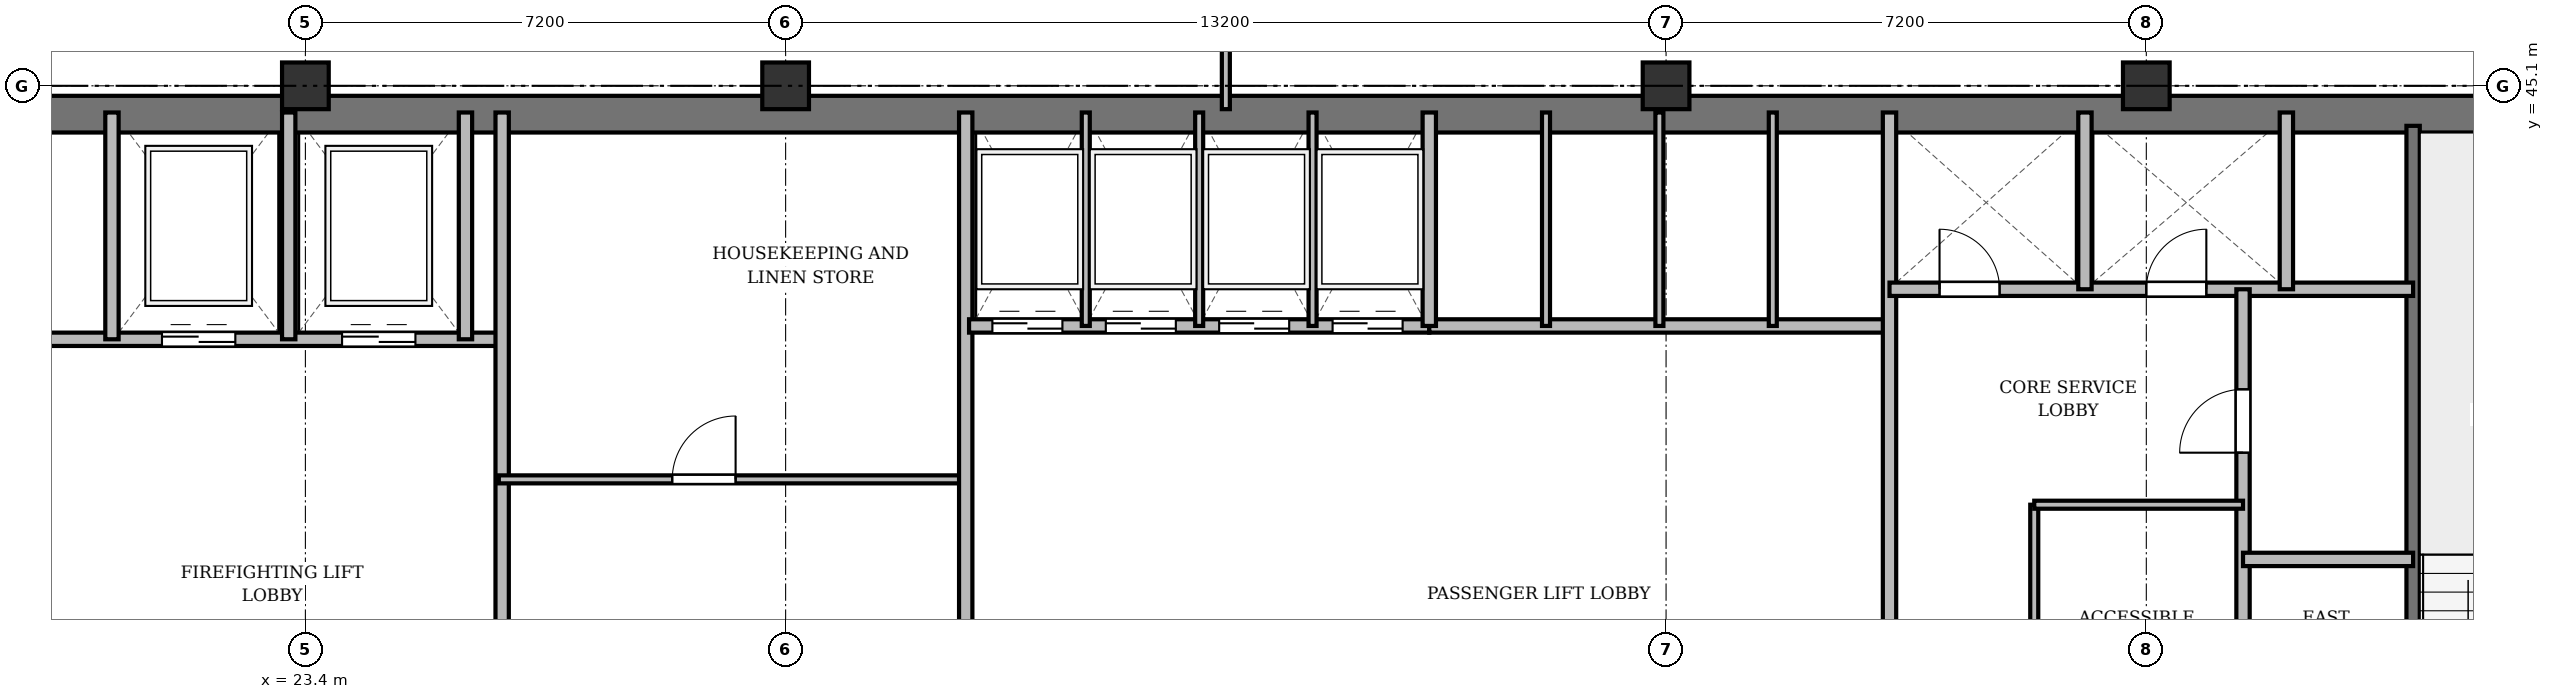
"""IFC4 building model, lengths in metres.
Left out: names, types, materials, properties, quantities, classifications, styles, units other than length and angle.
Written with IfcOpenShell. Run it as: python <this file> out.ifc"""

import sys

from ifc_helpers import new_model, si_unit, direction, frame, frame_2d, origin, origin_2d, place, context, subcontext, project, spatial, rectangle, extrude, source, transform, mapped, element, fill, save


model = new_model("IFC4")
c1 = context("Model", 3, precision=1e-05, world=origin(), true_north=direction((0.0, 1.0)))
c2 = subcontext(c1, "Body", "Model", "MODEL_VIEW")
j1 = project(units=[si_unit("LENGTHUNIT", "METRE"), si_unit("PLANEANGLEUNIT", "RADIAN")], contexts=[c1])
p1 = place(None, origin())
s1 = spatial("IfcSite", under=j1, at=p1, CompositionType="ELEMENT")
p2 = place(p1, origin())
s2 = spatial("IfcBuilding", under=s1, at=p2, CompositionType="ELEMENT")
p3 = place(p2, frame((0.0, 0.0, 178.9)))
s3 = spatial("IfcBuildingStorey", under=s2, at=p3, CompositionType="ELEMENT", Elevation=178.9)
m1 = source(origin(), c2, "Body", "SweptSolid", [
    extrude(rectangle(XDim=0.7, YDim=0.7, at=origin_2d()), origin(), (0.0, 0.0, 1.0), 3.6),
])
for number, where, z_axis, x_axis in (
    (1, (23.4, 45.1, 0.0), (0.0, 0.0, 1.0), (1.0, 0.0, 0.0)),
    (2, (30.6, 45.1, 0.0), (0.0, 0.0, 1.0), (1.0, 0.0, 0.0)),
    (3, (43.8, 45.1, 0.0), (0.0, 0.0, 1.0), (1.0, 0.0, 0.0)),
    (4, (51.0, 45.1, 0.0), (0.0, 0.0, 1.0), (1.0, 0.0, 0.0)),
):
    element("IfcColumn", number, at=place(p3, frame(where, z_axis=z_axis, x_axis=x_axis)), inside=s3, PredefinedType="COLUMN", context=c2, shape_type="MappedRepresentation", body=[
        mapped(m1, transform((0.0, 0.0, 0.0), x_axis=(1.0, 0.0, 0.0), y_axis=(0.0, 1.0, 0.0), z_axis=(0.0, 0.0, 1.0), scale=1.0)),
    ])
p4 = place(p3, frame((15.65, 44.675, 0.0), z_axis=(0.0, 0.0, 1.0), x_axis=(1.0, 0.0, 0.0)))
e5 = element("IfcWall", 5, at=p4, inside=s3, PredefinedType="SHEAR", context=c2, shape_type="SweptSolid", body=[
    extrude(rectangle(XDim=43.1, YDim=0.55, at=frame_2d((21.55, 0.0))), origin(), (0.0, 0.0, 1.0), 3.22),
])
p5 = place(p3, frame((55.0, 33.4, 0.0), z_axis=(0.0, 0.0, 1.0), x_axis=(0.0, 1.0, 0.0)))
e6 = element("IfcWall", 6, at=p5, inside=s3, PredefinedType="SHEAR", context=c2, shape_type="SweptSolid", body=[
    extrude(rectangle(XDim=11.1, YDim=0.2, at=frame_2d((5.55, 0.0))), origin(), (0.0, 0.0, 1.0), 3.22),
])
p6 = place(p5, frame((0.85, 0.0, 0.0)))
e7 = element("IfcOpeningElement", 7, at=p6, cuts=e6, PredefinedType="OPENING", context=c2, shape_type="SweptSolid", body=[
    extrude(rectangle(XDim=1.1, YDim=2.15, at=frame_2d((0.55, 1.075))), frame((0.0, 0.11, 0.0), z_axis=(0.0, -1.0, 0.0), x_axis=(1.0, 0.0, 0.0)), (0.0, 0.0, 1.0), 0.22),
])
p7 = place(p3, frame((19.55, 41.3, 0.0), z_axis=(0.0, 0.0, 1.0), x_axis=(1.0, 0.0, 0.0)))
e8 = element("IfcWall", 8, at=p7, inside=s3, PredefinedType="SOLIDWALL", context=c2, shape_type="SweptSolid", body=[
    extrude(rectangle(XDim=6.75, YDim=0.2, at=frame_2d((3.375, 0.0))), origin(), (0.0, 0.0, 1.0), 3.22),
])
p8 = place(p7, frame((1.7, 0.0, 0.0)))
e9 = element("IfcOpeningElement", 9, at=p8, cuts=e8, PredefinedType="OPENING", context=c2, shape_type="SweptSolid", body=[
    extrude(rectangle(XDim=1.1, YDim=2.15, at=frame_2d((0.55, 1.075))), frame((0.0, 0.11, 0.0), z_axis=(0.0, -1.0, 0.0), x_axis=(1.0, 0.0, 0.0)), (0.0, 0.0, 1.0), 0.22),
])
p9 = place(p7, frame((4.4, 0.0, 0.0)))
e10 = element("IfcOpeningElement", 10, at=p9, cuts=e8, PredefinedType="OPENING", context=c2, shape_type="SweptSolid", body=[
    extrude(rectangle(XDim=1.1, YDim=2.15, at=frame_2d((0.55, 1.075))), frame((0.0, 0.11, 0.0), z_axis=(0.0, -1.0, 0.0), x_axis=(1.0, 0.0, 0.0)), (0.0, 0.0, 1.0), 0.22),
])
for number, where, z_axis, x_axis in (
    (11, (20.5, 41.3, 0.0), (0.0, 0.0, 1.0), (0.0, 1.0, 0.0)),
    (12, (23.15, 41.3, 0.0), (0.0, 0.0, 1.0), (0.0, 1.0, 0.0)),
    (13, (25.8, 41.3, 0.0), (0.0, 0.0, 1.0), (0.0, 1.0, 0.0)),
):
    element("IfcWall", number, at=place(p3, frame(where, z_axis=z_axis, x_axis=x_axis)), inside=s3, PredefinedType="SOLIDWALL", context=c2, shape_type="SweptSolid", body=[
        extrude(rectangle(XDim=3.4, YDim=0.2, at=frame_2d((1.7, 0.0))), origin(), (0.0, 0.0, 1.0), 3.22),
    ])
p10 = place(p3, frame((26.35, 33.4, 0.0), z_axis=(0.0, 0.0, 1.0), x_axis=(0.0, 1.0, 0.0)))
e14 = element("IfcWall", 14, at=p10, inside=s3, PredefinedType="SOLIDWALL", context=c2, shape_type="SweptSolid", body=[
    extrude(rectangle(XDim=11.3, YDim=0.2, at=frame_2d((5.65, 0.0))), origin(), (0.0, 0.0, 1.0), 2.62),
])
p11 = place(p3, frame((26.3, 39.2, 0.0), z_axis=(0.0, 0.0, 1.0), x_axis=(1.0, 0.0, 0.0)))
e15 = element("IfcWall", 15, at=p11, inside=s3, PredefinedType="PARTITIONING", context=c2, shape_type="SweptSolid", body=[
    extrude(rectangle(XDim=7.0, YDim=0.12, at=frame_2d((3.5, 0.0))), origin(), (0.0, 0.0, 1.0), 2.72),
])
p12 = place(p11, frame((2.6, 0.0, 0.0)))
e16 = element("IfcOpeningElement", 16, at=p12, cuts=e15, PredefinedType="OPENING", context=c2, shape_type="SweptSolid", body=[
    extrude(rectangle(XDim=0.95, YDim=2.15, at=frame_2d((0.475, 1.075))), frame((0.0, 0.07, 0.0), z_axis=(0.0, -1.0, 0.0), x_axis=(1.0, 0.0, 0.0)), (0.0, 0.0, 1.0), 0.14),
])
p13 = place(p3, frame((33.3, 33.4, 0.0), z_axis=(0.0, 0.0, 1.0), x_axis=(0.0, 1.0, 0.0)))
e17 = element("IfcWall", 17, at=p13, inside=s3, PredefinedType="SOLIDWALL", context=c2, shape_type="SweptSolid", body=[
    extrude(rectangle(XDim=11.3, YDim=0.2, at=frame_2d((5.65, 0.0))), origin(), (0.0, 0.0, 1.0), 2.62),
])
p14 = place(p3, frame((33.35, 41.5, 0.0), z_axis=(0.0, 0.0, 1.0), x_axis=(1.0, 0.0, 0.0)))
e18 = element("IfcWall", 18, at=p14, inside=s3, PredefinedType="SOLIDWALL", context=c2, shape_type="SweptSolid", body=[
    extrude(rectangle(XDim=6.9, YDim=0.2, at=frame_2d((3.45, 0.0))), origin(), (0.0, 0.0, 1.0), 3.22),
])
p15 = place(p14, frame((0.35, 0.0, 0.0)))
e19 = element("IfcOpeningElement", 19, at=p15, cuts=e18, PredefinedType="OPENING", context=c2, shape_type="SweptSolid", body=[
    extrude(rectangle(XDim=1.05, YDim=2.15, at=frame_2d((0.525, 1.075))), frame((0.0, 0.11, 0.0), z_axis=(0.0, -1.0, 0.0), x_axis=(1.0, 0.0, 0.0)), (0.0, 0.0, 1.0), 0.22),
])
p16 = place(p14, frame((2.05, 0.0, 0.0)))
e20 = element("IfcOpeningElement", 20, at=p16, cuts=e18, PredefinedType="OPENING", context=c2, shape_type="SweptSolid", body=[
    extrude(rectangle(XDim=1.05, YDim=2.15, at=frame_2d((0.525, 1.075))), frame((0.0, 0.11, 0.0), z_axis=(0.0, -1.0, 0.0), x_axis=(1.0, 0.0, 0.0)), (0.0, 0.0, 1.0), 0.22),
])
p17 = place(p14, frame((3.75, 0.0, 0.0)))
e21 = element("IfcOpeningElement", 21, at=p17, cuts=e18, PredefinedType="OPENING", context=c2, shape_type="SweptSolid", body=[
    extrude(rectangle(XDim=1.05, YDim=2.15, at=frame_2d((0.525, 1.075))), frame((0.0, 0.11, 0.0), z_axis=(0.0, -1.0, 0.0), x_axis=(1.0, 0.0, 0.0)), (0.0, 0.0, 1.0), 0.22),
])
p18 = place(p14, frame((5.45, 0.0, 0.0)))
e22 = element("IfcOpeningElement", 22, at=p18, cuts=e18, PredefinedType="OPENING", context=c2, shape_type="SweptSolid", body=[
    extrude(rectangle(XDim=1.05, YDim=2.15, at=frame_2d((0.525, 1.075))), frame((0.0, 0.11, 0.0), z_axis=(0.0, -1.0, 0.0), x_axis=(1.0, 0.0, 0.0)), (0.0, 0.0, 1.0), 0.22),
])
for number, where, z_axis, x_axis in (
    (23, (35.1, 41.5, 0.0), (0.0, 0.0, 1.0), (0.0, 1.0, 0.0)),
    (24, (36.8, 41.5, 0.0), (0.0, 0.0, 1.0), (0.0, 1.0, 0.0)),
    (25, (38.5, 41.5, 0.0), (0.0, 0.0, 1.0), (0.0, 1.0, 0.0)),
):
    element("IfcWall", number, at=place(p3, frame(where, z_axis=z_axis, x_axis=x_axis)), inside=s3, PredefinedType="PARTITIONING", context=c2, shape_type="SweptSolid", body=[
        extrude(rectangle(XDim=3.2, YDim=0.12, at=frame_2d((1.6, 0.0))), origin(), (0.0, 0.0, 1.0), 3.22),
    ])
p19 = place(p3, frame((40.25, 41.5, 0.0), z_axis=(0.0, 0.0, 1.0), x_axis=(1.0, 0.0, 0.0)))
e26 = element("IfcWall", 26, at=p19, inside=s3, PredefinedType="SOLIDWALL", context=c2, shape_type="SweptSolid", body=[
    extrude(rectangle(XDim=6.9, YDim=0.2, at=frame_2d((3.45, 0.0))), origin(), (0.0, 0.0, 1.0), 2.72),
])
p20 = place(p3, frame((40.25, 41.5, 0.0), z_axis=(0.0, 0.0, 1.0), x_axis=(0.0, 1.0, 0.0)))
e27 = element("IfcWall", 27, at=p20, inside=s3, PredefinedType="SOLIDWALL", context=c2, shape_type="SweptSolid", body=[
    extrude(rectangle(XDim=3.2, YDim=0.2, at=frame_2d((1.6, 0.0))), origin(), (0.0, 0.0, 1.0), 3.22),
])
p21 = place(p3, frame((42.0, 41.5, 0.0), z_axis=(0.0, 0.0, 1.0), x_axis=(0.0, 1.0, 0.0)))
e28 = element("IfcWall", 28, at=p21, inside=s3, PredefinedType="PARTITIONING", context=c2, shape_type="SweptSolid", body=[
    extrude(rectangle(XDim=3.2, YDim=0.12, at=frame_2d((1.6, 0.0))), origin(), (0.0, 0.0, 1.0), 3.22),
])
p22 = place(p3, frame((43.7, 41.5, 0.0), z_axis=(0.0, 0.0, 1.0), x_axis=(0.0, 1.0, 0.0)))
e29 = element("IfcWall", 29, at=p22, inside=s3, PredefinedType="PARTITIONING", context=c2, shape_type="SweptSolid", body=[
    extrude(rectangle(XDim=3.2, YDim=0.12, at=frame_2d((1.6, 0.0))), origin(), (0.0, 0.0, 1.0), 2.72),
])
p23 = place(p3, frame((45.4, 41.5, 0.0), z_axis=(0.0, 0.0, 1.0), x_axis=(0.0, 1.0, 0.0)))
e30 = element("IfcWall", 30, at=p23, inside=s3, PredefinedType="PARTITIONING", context=c2, shape_type="SweptSolid", body=[
    extrude(rectangle(XDim=3.2, YDim=0.12, at=frame_2d((1.6, 0.0))), origin(), (0.0, 0.0, 1.0), 3.22),
])
p24 = place(p3, frame((47.15, 33.4, 0.0), z_axis=(0.0, 0.0, 1.0), x_axis=(0.0, 1.0, 0.0)))
e31 = element("IfcWall", 31, at=p24, inside=s3, PredefinedType="SOLIDWALL", context=c2, shape_type="SweptSolid", body=[
    extrude(rectangle(XDim=11.3, YDim=0.2, at=frame_2d((5.65, 0.0))), origin(), (0.0, 0.0, 1.0), 2.62),
])
p25 = place(p3, frame((47.15, 42.05, 0.0), z_axis=(0.0, 0.0, 1.0), x_axis=(1.0, 0.0, 0.0)))
e32 = element("IfcWall", 32, at=p25, inside=s3, PredefinedType="SOLIDWALL", context=c2, shape_type="SweptSolid", body=[
    extrude(rectangle(XDim=7.85, YDim=0.2, at=frame_2d((3.925, 0.0))), origin(), (0.0, 0.0, 1.0), 2.72),
])
p26 = place(p25, frame((0.75, 0.0, 0.0)))
e33 = element("IfcOpeningElement", 33, at=p26, cuts=e32, PredefinedType="OPENING", context=c2, shape_type="SweptSolid", body=[
    extrude(rectangle(XDim=0.9, YDim=2.1, at=frame_2d((0.45, 1.05))), frame((0.0, 0.11, 0.0), z_axis=(0.0, -1.0, 0.0), x_axis=(1.0, 0.0, 0.0)), (0.0, 0.0, 1.0), 0.22),
])
p27 = place(p25, frame((3.85, 0.0, 0.0)))
e34 = element("IfcOpeningElement", 34, at=p27, cuts=e32, PredefinedType="OPENING", context=c2, shape_type="SweptSolid", body=[
    extrude(rectangle(XDim=0.9, YDim=2.1, at=frame_2d((0.45, 1.05))), frame((0.0, 0.11, 0.0), z_axis=(0.0, -1.0, 0.0), x_axis=(1.0, 0.0, 0.0)), (0.0, 0.0, 1.0), 0.22),
])
for number, where, z_axis, x_axis in (
    (35, (50.08, 42.05, 0.0), (0.0, 0.0, 1.0), (0.0, 1.0, 0.0)),
    (36, (53.1, 42.05, 0.0), (0.0, 0.0, 1.0), (0.0, 1.0, 0.0)),
):
    element("IfcWall", number, at=place(p3, frame(where, z_axis=z_axis, x_axis=x_axis)), inside=s3, PredefinedType="SOLIDWALL", context=c2, shape_type="SweptSolid", body=[
        extrude(rectangle(XDim=2.65, YDim=0.2, at=frame_2d((1.325, 0.0))), origin(), (0.0, 0.0, 1.0), 3.22),
    ])
p28 = place(p3, frame((52.45, 33.4, 0.0), z_axis=(0.0, 0.0, 1.0), x_axis=(0.0, 1.0, 0.0)))
e37 = element("IfcWall", 37, at=p28, inside=s3, PredefinedType="PARTITIONING", context=c2, shape_type="SweptSolid", body=[
    extrude(rectangle(XDim=8.65, YDim=0.2, at=frame_2d((4.325, 0.0))), origin(), (0.0, 0.0, 1.0), 2.62),
])
p29 = place(p28, frame((6.2, 0.0, 0.0)))
e38 = element("IfcOpeningElement", 38, at=p29, cuts=e37, PredefinedType="OPENING", context=c2, shape_type="SweptSolid", body=[
    extrude(rectangle(XDim=0.95, YDim=2.15, at=frame_2d((0.475, 1.075))), frame((0.0, 0.11, 0.0), z_axis=(0.0, -1.0, 0.0), x_axis=(1.0, 0.0, 0.0)), (0.0, 0.0, 1.0), 0.22),
])
p30 = place(p3, frame((52.45, 38.0, 0.0), z_axis=(0.0, 0.0, 1.0), x_axis=(1.0, 0.0, 0.0)))
e39 = element("IfcWall", 39, at=p30, inside=s3, PredefinedType="PARTITIONING", context=c2, shape_type="SweptSolid", body=[
    extrude(rectangle(XDim=2.55, YDim=0.2, at=frame_2d((1.275, 0.0))), origin(), (0.0, 0.0, 1.0), 3.22),
])
p31 = place(p3, frame((49.32, 33.4, 0.0), z_axis=(0.0, 0.0, 1.0), x_axis=(0.0, 1.0, 0.0)))
e40 = element("IfcWall", 40, at=p31, inside=s3, PredefinedType="PARTITIONING", context=c2, shape_type="SweptSolid", body=[
    extrude(rectangle(XDim=5.42, YDim=0.12, at=frame_2d((2.71, 0.0))), origin(), (0.0, 0.0, 1.0), 2.62),
])
p32 = place(p31, frame((1.6, 0.0, 0.0)))
e41 = element("IfcOpeningElement", 41, at=p32, cuts=e40, PredefinedType="OPENING", context=c2, shape_type="SweptSolid", body=[
    extrude(rectangle(XDim=0.95, YDim=2.15, at=frame_2d((0.475, 1.075))), frame((0.0, 0.07, 0.0), z_axis=(0.0, -1.0, 0.0), x_axis=(1.0, 0.0, 0.0)), (0.0, 0.0, 1.0), 0.14),
])
p33 = place(p3, frame((49.32, 38.82, 0.0), z_axis=(0.0, 0.0, 1.0), x_axis=(1.0, 0.0, 0.0)))
e42 = element("IfcWall", 42, at=p33, inside=s3, PredefinedType="PARTITIONING", context=c2, shape_type="SweptSolid", body=[
    extrude(rectangle(XDim=3.13, YDim=0.12, at=frame_2d((1.565, 0.0))), origin(), (0.0, 0.0, 1.0), 2.72),
])
p34 = place(p3, frame((37.2, 44.75, 0.0), z_axis=(0.0, 0.0, 1.0), x_axis=(0.0, 1.0, 0.0)))
e43 = element("IfcWall", 43, at=p34, inside=s3, PredefinedType="PARTITIONING", context=c2, shape_type="SweptSolid", body=[
    extrude(rectangle(XDim=3.61, YDim=0.12, at=frame_2d((1.805, 0.0))), origin(), (0.0, 0.0, 1.0), 2.62),
])
p35 = place(p34, frame((1.1, 0.0, 0.0)))
e44 = element("IfcOpeningElement", 44, at=p35, cuts=e43, PredefinedType="OPENING", context=c2, shape_type="SweptSolid", body=[
    extrude(rectangle(XDim=0.95, YDim=2.15, at=frame_2d((0.475, 1.075))), frame((0.0, 0.07, 0.0), z_axis=(0.0, -1.0, 0.0), x_axis=(1.0, 0.0, 0.0)), (0.0, 0.0, 1.0), 0.14),
])
m2 = source(origin(), c2, "Body", "SweptSolid", [
    extrude(rectangle(XDim=1.1, YDim=2.15, at=frame_2d((0.55, 1.075))), frame((0.0, 0.025, 0.0), z_axis=(0.0, -1.0, 0.0), x_axis=(1.0, 0.0, 0.0)), (0.0, 0.0, 1.0), 0.05),
])
p36 = place(p8, origin())
e45 = element("IfcDoor", 45, at=p36, inside=s3, OperationType="DOUBLE_DOOR_SLIDING", PredefinedType="DOOR", context=c2, shape_type="MappedRepresentation", body=[
    mapped(m2, transform((0.0, 0.0, 0.0), x_axis=(1.0, 0.0, 0.0), y_axis=(0.0, 1.0, 0.0), z_axis=(0.0, 0.0, 1.0), scale=1.0)),
])
fill(e9, e45)
p37 = place(p9, origin())
e46 = element("IfcDoor", 46, at=p37, inside=s3, OperationType="DOUBLE_DOOR_SLIDING", PredefinedType="DOOR", context=c2, shape_type="MappedRepresentation", body=[
    mapped(m2, transform((0.0, 0.0, 0.0), x_axis=(1.0, 0.0, 0.0), y_axis=(0.0, 1.0, 0.0), z_axis=(0.0, 0.0, 1.0), scale=1.0)),
])
fill(e10, e46)
m3 = source(origin(), c2, "Body", "SweptSolid", [
    extrude(rectangle(XDim=0.95, YDim=2.15, at=frame_2d((0.475, 1.075))), frame((0.0, 0.025, 0.0), z_axis=(0.0, -1.0, 0.0), x_axis=(1.0, 0.0, 0.0)), (0.0, 0.0, 1.0), 0.05),
])
p38 = place(p12, origin())
e47 = element("IfcDoor", 47, at=p38, inside=s3, OperationType="SINGLE_SWING_RIGHT", PredefinedType="DOOR", context=c2, shape_type="MappedRepresentation", body=[
    mapped(m3, transform((0.0, 0.0, 0.0), x_axis=(1.0, 0.0, 0.0), y_axis=(0.0, 1.0, 0.0), z_axis=(0.0, 0.0, 1.0), scale=1.0)),
])
fill(e16, e47)
m4 = source(origin(), c2, "Body", "SweptSolid", [
    extrude(rectangle(XDim=1.05, YDim=2.15, at=frame_2d((0.525, 1.075))), frame((0.0, 0.025, 0.0), z_axis=(0.0, -1.0, 0.0), x_axis=(1.0, 0.0, 0.0)), (0.0, 0.0, 1.0), 0.05),
])
p39 = place(p15, origin())
e48 = element("IfcDoor", 48, at=p39, inside=s3, OperationType="DOUBLE_DOOR_SLIDING", PredefinedType="DOOR", context=c2, shape_type="MappedRepresentation", body=[
    mapped(m4, transform((0.0, 0.0, 0.0), x_axis=(1.0, 0.0, 0.0), y_axis=(0.0, 1.0, 0.0), z_axis=(0.0, 0.0, 1.0), scale=1.0)),
])
fill(e19, e48)
p40 = place(p16, origin())
e49 = element("IfcDoor", 49, at=p40, inside=s3, OperationType="DOUBLE_DOOR_SLIDING", PredefinedType="DOOR", context=c2, shape_type="MappedRepresentation", body=[
    mapped(m4, transform((0.0, 0.0, 0.0), x_axis=(1.0, 0.0, 0.0), y_axis=(0.0, 1.0, 0.0), z_axis=(0.0, 0.0, 1.0), scale=1.0)),
])
fill(e20, e49)
p41 = place(p17, origin())
e50 = element("IfcDoor", 50, at=p41, inside=s3, OperationType="DOUBLE_DOOR_SLIDING", PredefinedType="DOOR", context=c2, shape_type="MappedRepresentation", body=[
    mapped(m4, transform((0.0, 0.0, 0.0), x_axis=(1.0, 0.0, 0.0), y_axis=(0.0, 1.0, 0.0), z_axis=(0.0, 0.0, 1.0), scale=1.0)),
])
fill(e21, e50)
p42 = place(p18, origin())
e51 = element("IfcDoor", 51, at=p42, inside=s3, OperationType="DOUBLE_DOOR_SLIDING", PredefinedType="DOOR", context=c2, shape_type="MappedRepresentation", body=[
    mapped(m4, transform((0.0, 0.0, 0.0), x_axis=(1.0, 0.0, 0.0), y_axis=(0.0, 1.0, 0.0), z_axis=(0.0, 0.0, 1.0), scale=1.0)),
])
fill(e22, e51)
m5 = source(origin(), c2, "Body", "SweptSolid", [
    extrude(rectangle(XDim=0.9, YDim=2.1, at=frame_2d((0.45, 1.05))), frame((0.0, 0.025, 0.0), z_axis=(0.0, -1.0, 0.0), x_axis=(1.0, 0.0, 0.0)), (0.0, 0.0, 1.0), 0.05),
])
p43 = place(p26, origin())
e52 = element("IfcDoor", 52, at=p43, inside=s3, OperationType="SINGLE_SWING_LEFT", PredefinedType="DOOR", context=c2, shape_type="MappedRepresentation", body=[
    mapped(m5, transform((0.0, 0.0, 0.0), x_axis=(1.0, 0.0, 0.0), y_axis=(0.0, 1.0, 0.0), z_axis=(0.0, 0.0, 1.0), scale=1.0)),
])
fill(e33, e52)
p44 = place(p27, origin())
e53 = element("IfcDoor", 53, at=p44, inside=s3, OperationType="SINGLE_SWING_RIGHT", PredefinedType="DOOR", context=c2, shape_type="MappedRepresentation", body=[
    mapped(m5, transform((0.0, 0.0, 0.0), x_axis=(1.0, 0.0, 0.0), y_axis=(0.0, 1.0, 0.0), z_axis=(0.0, 0.0, 1.0), scale=1.0)),
])
fill(e34, e53)
p45 = place(p29, origin())
e54 = element("IfcDoor", 54, at=p45, inside=s3, OperationType="SINGLE_SWING_LEFT", PredefinedType="DOOR", context=c2, shape_type="MappedRepresentation", body=[
    mapped(m3, transform((0.0, 0.0, 0.0), x_axis=(1.0, 0.0, 0.0), y_axis=(0.0, 1.0, 0.0), z_axis=(0.0, 0.0, 1.0), scale=1.0)),
])
fill(e38, e54)
save(model, sys.argv[1])
